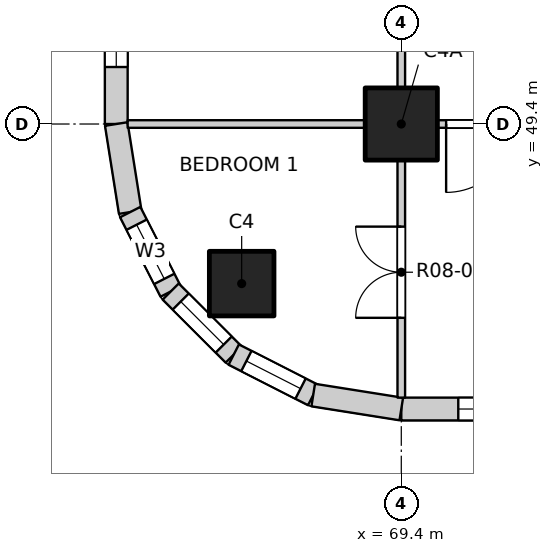
"""IFC4 building model, lengths in metres.
Left out: names, types, materials, properties, quantities, classifications, styles, units other than length and angle.
Written with IfcOpenShell. Run it as: python <this file> out.ifc"""

import sys

from ifc_helpers import new_model, si_unit, direction, frame, frame_2d, origin, origin_2d, place, context, subcontext, project, spatial, rectangle, extrude, element, fill, save


model = new_model("IFC4")
c1 = context("Model", 3, precision=1e-05, world=origin(), true_north=direction((0.0, 1.0)))
c2 = subcontext(c1, "Body", "Model", "MODEL_VIEW")
j1 = project(units=[si_unit("LENGTHUNIT", "METRE"), si_unit("PLANEANGLEUNIT", "RADIAN")], contexts=[c1])
p1 = place(None, origin())
s1 = spatial("IfcSite", under=j1, at=p1, CompositionType="ELEMENT")
p2 = place(p1, origin())
s2 = spatial("IfcBuilding", under=s1, at=p2, CompositionType="ELEMENT")
p3 = place(p2, frame((0.0, 0.0, 103.3)))
s3 = spatial("IfcBuildingStorey", under=s2, at=p3, CompositionType="ELEMENT", Elevation=103.3)
p4 = place(p3, frame((67.3, 47.3, -0.25), z_axis=(0.0, 0.0, 1.0), x_axis=(1.0, 0.0, 0.0)))
e1 = element("IfcColumn", 1, at=p4, inside=s3, PredefinedType="COLUMN", context=c2, shape_type="SweptSolid", body=[
    extrude(rectangle(XDim=0.85, YDim=0.85, at=origin_2d()), origin(), (0.0, 0.0, 1.0), 3.4),
])
p5 = place(p3, frame((69.4, 49.4, -0.25), z_axis=(0.0, 0.0, 1.0), x_axis=(1.0, 0.0, 0.0)))
e2 = element("IfcColumn", 2, at=p5, inside=s3, PredefinedType="COLUMN", context=c2, shape_type="SweptSolid", body=[
    extrude(rectangle(XDim=0.95, YDim=0.95, at=origin_2d()), origin(), (0.0, 0.0, 1.0), 3.4),
])
p6 = place(p3, frame((69.4, 45.65, 0.0), z_axis=(0.0, 0.0, 1.0), x_axis=(1.0, 0.0, 0.0)))
e3 = element("IfcWall", 3, at=p6, inside=s3, PredefinedType="SOLIDWALL", context=c2, shape_type="SweptSolid", body=[
    extrude(rectangle(XDim=3.475, YDim=0.3, at=frame_2d((1.738, 0.0))), origin(), (0.0, 0.0, 1.0), 2.7),
])
p7 = place(p6, frame((0.75, 0.0, 0.9)))
e4 = element("IfcOpeningElement", 4, at=p7, cuts=e3, PredefinedType="OPENING", context=c2, shape_type="SweptSolid", body=[
    extrude(rectangle(XDim=2.4, YDim=1.8, at=frame_2d((1.2, 0.9))), frame((0.0, 0.16, 0.0), z_axis=(0.0, -1.0, 0.0), x_axis=(1.0, 0.0, 0.0)), (0.0, 0.0, 1.0), 0.32),
])
p8 = place(p3, frame((65.65, 49.4, 0.0), z_axis=(0.0, 0.0, 1.0), x_axis=(0.0, 1.0, 0.0)))
e5 = element("IfcWall", 5, at=p8, inside=s3, PredefinedType="SOLIDWALL", context=c2, shape_type="SweptSolid", body=[
    extrude(rectangle(XDim=3.475, YDim=0.3, at=frame_2d((1.738, 0.0))), origin(), (0.0, 0.0, 1.0), 2.7),
])
p9 = place(p8, frame((0.75, 0.0, 0.9)))
e6 = element("IfcOpeningElement", 6, at=p9, cuts=e5, PredefinedType="OPENING", context=c2, shape_type="SweptSolid", body=[
    extrude(rectangle(XDim=2.4, YDim=1.8, at=frame_2d((1.2, 0.9))), frame((0.0, 0.16, 0.0), z_axis=(0.0, -1.0, 0.0), x_axis=(1.0, 0.0, 0.0)), (0.0, 0.0, 1.0), 0.32),
])
p10 = place(p3, frame((65.65, 49.4, 0.0), z_axis=(0.0, 0.0, 1.0), x_axis=(0.156496880861, -0.987678452879, 0.0)))
e7 = element("IfcWall", 7, at=p10, inside=s3, PredefinedType="SOLIDWALL", context=c2, shape_type="SweptSolid", body=[
    extrude(rectangle(XDim=1.173, YDim=0.3, at=frame_2d((0.586, 0.0))), origin(), (0.0, 0.0, 1.0), 2.7),
])
p11 = place(p3, frame((65.833, 48.241, 0.0), z_axis=(0.0, 0.0, 1.0), x_axis=(0.454025524128, -0.890988677504, 0.0)))
e8 = element("IfcWall", 8, at=p11, inside=s3, PredefinedType="SOLIDWALL", context=c2, shape_type="SweptSolid", body=[
    extrude(rectangle(XDim=1.173, YDim=0.3, at=frame_2d((0.587, 0.0))), origin(), (0.0, 0.0, 1.0), 2.7),
])
p12 = place(p11, frame((0.187, 0.0, 0.9)))
e9 = element("IfcOpeningElement", 9, at=p12, cuts=e8, PredefinedType="OPENING", context=c2, shape_type="SweptSolid", body=[
    extrude(rectangle(XDim=0.8, YDim=1.2, at=frame_2d((0.4, 0.6))), frame((0.0, 0.16, 0.0), z_axis=(0.0, -1.0, 0.0), x_axis=(1.0, 0.0, 0.0)), (0.0, 0.0, 1.0), 0.32),
])
p13 = place(p3, frame((66.366, 47.196, 0.0), z_axis=(0.0, 0.0, 1.0), x_axis=(0.707106781187, -0.707106781187, 0.0)))
e10 = element("IfcWall", 10, at=p13, inside=s3, PredefinedType="SOLIDWALL", context=c2, shape_type="SweptSolid", body=[
    extrude(rectangle(XDim=1.173, YDim=0.3, at=frame_2d((0.586, 0.0))), origin(), (0.0, 0.0, 1.0), 2.7),
])
p14 = place(p13, frame((0.187, 0.0, 0.9)))
e11 = element("IfcOpeningElement", 11, at=p14, cuts=e10, PredefinedType="OPENING", context=c2, shape_type="SweptSolid", body=[
    extrude(rectangle(XDim=0.8, YDim=1.2, at=frame_2d((0.4, 0.6))), frame((0.0, 0.16, 0.0), z_axis=(0.0, -1.0, 0.0), x_axis=(1.0, 0.0, 0.0)), (0.0, 0.0, 1.0), 0.32),
])
p15 = place(p3, frame((67.196, 46.366, 0.0), z_axis=(0.0, 0.0, 1.0), x_axis=(0.890988677504, -0.454025524128, 0.0)))
e12 = element("IfcWall", 12, at=p15, inside=s3, PredefinedType="SOLIDWALL", context=c2, shape_type="SweptSolid", body=[
    extrude(rectangle(XDim=1.173, YDim=0.3, at=frame_2d((0.587, 0.0))), origin(), (0.0, 0.0, 1.0), 2.7),
])
p16 = place(p15, frame((0.187, 0.0, 0.9)))
e13 = element("IfcOpeningElement", 13, at=p16, cuts=e12, PredefinedType="OPENING", context=c2, shape_type="SweptSolid", body=[
    extrude(rectangle(XDim=0.8, YDim=1.2, at=frame_2d((0.4, 0.6))), frame((0.0, 0.16, 0.0), z_axis=(0.0, -1.0, 0.0), x_axis=(1.0, 0.0, 0.0)), (0.0, 0.0, 1.0), 0.32),
])
p17 = place(p3, frame((68.241, 45.833, 0.0), z_axis=(0.0, 0.0, 1.0), x_axis=(0.987678452879, -0.156496880861, 0.0)))
e14 = element("IfcWall", 14, at=p17, inside=s3, PredefinedType="SOLIDWALL", context=c2, shape_type="SweptSolid", body=[
    extrude(rectangle(XDim=1.173, YDim=0.3, at=frame_2d((0.586, 0.0))), origin(), (0.0, 0.0, 1.0), 2.7),
])
p18 = place(p3, frame((65.8, 49.4, 0.0), z_axis=(0.0, 0.0, 1.0), x_axis=(1.0, 0.0, 0.0)))
e15 = element("IfcWall", 15, at=p18, inside=s3, PredefinedType="PARTITIONING", context=c2, shape_type="SweptSolid", body=[
    extrude(rectangle(XDim=38.4, YDim=0.1, at=frame_2d((19.2, 0.0))), origin(), (0.0, 0.0, 1.0), 3.15),
])
p19 = place(p18, frame((4.19, 0.0, 0.0)))
e16 = element("IfcOpeningElement", 16, at=p19, cuts=e15, PredefinedType="OPENING", context=c2, shape_type="SweptSolid", body=[
    extrude(rectangle(XDim=0.9, YDim=2.1, at=frame_2d((0.45, 1.05))), frame((0.0, 0.06, 0.0), z_axis=(0.0, -1.0, 0.0), x_axis=(1.0, 0.0, 0.0)), (0.0, 0.0, 1.0), 0.12),
])
p20 = place(p18, frame((9.0, 0.0, 0.0)))
e17 = element("IfcOpeningElement", 17, at=p20, cuts=e15, PredefinedType="OPENING", context=c2, shape_type="SweptSolid", body=[
    extrude(rectangle(XDim=0.9, YDim=2.1, at=frame_2d((0.45, 1.05))), frame((0.0, 0.06, 0.0), z_axis=(0.0, -1.0, 0.0), x_axis=(1.0, 0.0, 0.0)), (0.0, 0.0, 1.0), 0.12),
])
p21 = place(p18, frame((12.9, 0.0, 0.0)))
e18 = element("IfcOpeningElement", 18, at=p21, cuts=e15, PredefinedType="OPENING", context=c2, shape_type="SweptSolid", body=[
    extrude(rectangle(XDim=0.9, YDim=2.1, at=frame_2d((0.45, 1.05))), frame((0.0, 0.06, 0.0), z_axis=(0.0, -1.0, 0.0), x_axis=(1.0, 0.0, 0.0)), (0.0, 0.0, 1.0), 0.12),
])
p22 = place(p18, frame((16.8, 0.0, 0.0)))
e19 = element("IfcOpeningElement", 19, at=p22, cuts=e15, PredefinedType="OPENING", context=c2, shape_type="SweptSolid", body=[
    extrude(rectangle(XDim=0.9, YDim=2.1, at=frame_2d((0.45, 1.05))), frame((0.0, 0.06, 0.0), z_axis=(0.0, -1.0, 0.0), x_axis=(1.0, 0.0, 0.0)), (0.0, 0.0, 1.0), 0.12),
])
p23 = place(p18, frame((20.7, 0.0, 0.0)))
e20 = element("IfcOpeningElement", 20, at=p23, cuts=e15, PredefinedType="OPENING", context=c2, shape_type="SweptSolid", body=[
    extrude(rectangle(XDim=0.9, YDim=2.1, at=frame_2d((0.45, 1.05))), frame((0.0, 0.06, 0.0), z_axis=(0.0, -1.0, 0.0), x_axis=(1.0, 0.0, 0.0)), (0.0, 0.0, 1.0), 0.12),
])
p24 = place(p18, frame((24.6, 0.0, 0.0)))
e21 = element("IfcOpeningElement", 21, at=p24, cuts=e15, PredefinedType="OPENING", context=c2, shape_type="SweptSolid", body=[
    extrude(rectangle(XDim=0.9, YDim=2.1, at=frame_2d((0.45, 1.05))), frame((0.0, 0.06, 0.0), z_axis=(0.0, -1.0, 0.0), x_axis=(1.0, 0.0, 0.0)), (0.0, 0.0, 1.0), 0.12),
])
p25 = place(p18, frame((28.5, 0.0, 0.0)))
e22 = element("IfcOpeningElement", 22, at=p25, cuts=e15, PredefinedType="OPENING", context=c2, shape_type="SweptSolid", body=[
    extrude(rectangle(XDim=0.9, YDim=2.1, at=frame_2d((0.45, 1.05))), frame((0.0, 0.06, 0.0), z_axis=(0.0, -1.0, 0.0), x_axis=(1.0, 0.0, 0.0)), (0.0, 0.0, 1.0), 0.12),
])
p26 = place(p18, frame((33.31, 0.0, 0.0)))
e23 = element("IfcOpeningElement", 23, at=p26, cuts=e15, PredefinedType="OPENING", context=c2, shape_type="SweptSolid", body=[
    extrude(rectangle(XDim=0.9, YDim=2.1, at=frame_2d((0.45, 1.05))), frame((0.0, 0.06, 0.0), z_axis=(0.0, -1.0, 0.0), x_axis=(1.0, 0.0, 0.0)), (0.0, 0.0, 1.0), 0.12),
])
p27 = place(p3, frame((69.4, 45.8, 0.0), z_axis=(0.0, 0.0, 1.0), x_axis=(0.0, 1.0, 0.0)))
e24 = element("IfcWall", 24, at=p27, inside=s3, PredefinedType="PARTITIONING", context=c2, shape_type="SweptSolid", body=[
    extrude(rectangle(XDim=38.4, YDim=0.1, at=frame_2d((19.2, 0.0))), origin(), (0.0, 0.0, 1.0), 3.15),
])
p28 = place(p27, frame((1.05, 0.0, 0.0)))
e25 = element("IfcOpeningElement", 25, at=p28, cuts=e24, PredefinedType="OPENING", context=c2, shape_type="SweptSolid", body=[
    extrude(rectangle(XDim=1.2, YDim=2.1, at=frame_2d((0.6, 1.05))), frame((0.0, 0.06, 0.0), z_axis=(0.0, -1.0, 0.0), x_axis=(1.0, 0.0, 0.0)), (0.0, 0.0, 1.0), 0.12),
])
p29 = place(p27, frame((5.1, 0.0, 0.0)))
e26 = element("IfcOpeningElement", 26, at=p29, cuts=e24, PredefinedType="OPENING", context=c2, shape_type="SweptSolid", body=[
    extrude(rectangle(XDim=0.9, YDim=2.1, at=frame_2d((0.45, 1.05))), frame((0.0, 0.06, 0.0), z_axis=(0.0, -1.0, 0.0), x_axis=(1.0, 0.0, 0.0)), (0.0, 0.0, 1.0), 0.12),
])
p30 = place(p27, frame((9.0, 0.0, 0.0)))
e27 = element("IfcOpeningElement", 27, at=p30, cuts=e24, PredefinedType="OPENING", context=c2, shape_type="SweptSolid", body=[
    extrude(rectangle(XDim=0.9, YDim=2.1, at=frame_2d((0.45, 1.05))), frame((0.0, 0.06, 0.0), z_axis=(0.0, -1.0, 0.0), x_axis=(1.0, 0.0, 0.0)), (0.0, 0.0, 1.0), 0.12),
])
p31 = place(p27, frame((12.9, 0.0, 0.0)))
e28 = element("IfcOpeningElement", 28, at=p31, cuts=e24, PredefinedType="OPENING", context=c2, shape_type="SweptSolid", body=[
    extrude(rectangle(XDim=0.9, YDim=2.1, at=frame_2d((0.45, 1.05))), frame((0.0, 0.06, 0.0), z_axis=(0.0, -1.0, 0.0), x_axis=(1.0, 0.0, 0.0)), (0.0, 0.0, 1.0), 0.12),
])
p32 = place(p27, frame((16.8, 0.0, 0.0)))
e29 = element("IfcOpeningElement", 29, at=p32, cuts=e24, PredefinedType="OPENING", context=c2, shape_type="SweptSolid", body=[
    extrude(rectangle(XDim=0.9, YDim=2.1, at=frame_2d((0.45, 1.05))), frame((0.0, 0.06, 0.0), z_axis=(0.0, -1.0, 0.0), x_axis=(1.0, 0.0, 0.0)), (0.0, 0.0, 1.0), 0.12),
])
p33 = place(p27, frame((20.7, 0.0, 0.0)))
e30 = element("IfcOpeningElement", 30, at=p33, cuts=e24, PredefinedType="OPENING", context=c2, shape_type="SweptSolid", body=[
    extrude(rectangle(XDim=0.9, YDim=2.1, at=frame_2d((0.45, 1.05))), frame((0.0, 0.06, 0.0), z_axis=(0.0, -1.0, 0.0), x_axis=(1.0, 0.0, 0.0)), (0.0, 0.0, 1.0), 0.12),
])
p34 = place(p27, frame((24.6, 0.0, 0.0)))
e31 = element("IfcOpeningElement", 31, at=p34, cuts=e24, PredefinedType="OPENING", context=c2, shape_type="SweptSolid", body=[
    extrude(rectangle(XDim=0.9, YDim=2.1, at=frame_2d((0.45, 1.05))), frame((0.0, 0.06, 0.0), z_axis=(0.0, -1.0, 0.0), x_axis=(1.0, 0.0, 0.0)), (0.0, 0.0, 1.0), 0.12),
])
p35 = place(p27, frame((28.5, 0.0, 0.0)))
e32 = element("IfcOpeningElement", 32, at=p35, cuts=e24, PredefinedType="OPENING", context=c2, shape_type="SweptSolid", body=[
    extrude(rectangle(XDim=0.9, YDim=2.1, at=frame_2d((0.45, 1.05))), frame((0.0, 0.06, 0.0), z_axis=(0.0, -1.0, 0.0), x_axis=(1.0, 0.0, 0.0)), (0.0, 0.0, 1.0), 0.12),
])
p36 = place(p27, frame((32.4, 0.0, 0.0)))
e33 = element("IfcOpeningElement", 33, at=p36, cuts=e24, PredefinedType="OPENING", context=c2, shape_type="SweptSolid", body=[
    extrude(rectangle(XDim=0.9, YDim=2.1, at=frame_2d((0.45, 1.05))), frame((0.0, 0.06, 0.0), z_axis=(0.0, -1.0, 0.0), x_axis=(1.0, 0.0, 0.0)), (0.0, 0.0, 1.0), 0.12),
])
p37 = place(p27, frame((36.15, 0.0, 0.0)))
e34 = element("IfcOpeningElement", 34, at=p37, cuts=e24, PredefinedType="OPENING", context=c2, shape_type="SweptSolid", body=[
    extrude(rectangle(XDim=1.2, YDim=2.1, at=frame_2d((0.6, 1.05))), frame((0.0, 0.06, 0.0), z_axis=(0.0, -1.0, 0.0), x_axis=(1.0, 0.0, 0.0)), (0.0, 0.0, 1.0), 0.12),
])
p38 = place(p7, origin())
e35 = element("IfcWindow", 35, at=p38, inside=s3, PartitioningType="DOUBLE_PANEL_VERTICAL", PredefinedType="WINDOW", context=c2, shape_type="SweptSolid", body=[
    extrude(rectangle(XDim=2.4, YDim=1.8, at=frame_2d((1.2, 0.9))), frame((0.0, 0.03, 0.0), z_axis=(0.0, -1.0, 0.0), x_axis=(1.0, 0.0, 0.0)), (0.0, 0.0, 1.0), 0.06),
])
fill(e4, e35)
p39 = place(p9, origin())
e36 = element("IfcWindow", 36, at=p39, inside=s3, PartitioningType="DOUBLE_PANEL_VERTICAL", PredefinedType="WINDOW", context=c2, shape_type="SweptSolid", body=[
    extrude(rectangle(XDim=2.4, YDim=1.8, at=frame_2d((1.2, 0.9))), frame((0.0, 0.03, 0.0), z_axis=(0.0, -1.0, 0.0), x_axis=(1.0, 0.0, 0.0)), (0.0, 0.0, 1.0), 0.06),
])
fill(e6, e36)
p40 = place(p12, origin())
e37 = element("IfcWindow", 37, at=p40, inside=s3, PartitioningType="SINGLE_PANEL", PredefinedType="WINDOW", context=c2, shape_type="SweptSolid", body=[
    extrude(rectangle(XDim=0.8, YDim=1.2, at=frame_2d((0.4, 0.6))), frame((0.0, 0.03, 0.0), z_axis=(0.0, -1.0, 0.0), x_axis=(1.0, 0.0, 0.0)), (0.0, 0.0, 1.0), 0.06),
])
fill(e9, e37)
p41 = place(p14, origin())
e38 = element("IfcWindow", 38, at=p41, inside=s3, PartitioningType="SINGLE_PANEL", PredefinedType="WINDOW", context=c2, shape_type="SweptSolid", body=[
    extrude(rectangle(XDim=0.8, YDim=1.2, at=frame_2d((0.4, 0.6))), frame((0.0, 0.03, 0.0), z_axis=(0.0, -1.0, 0.0), x_axis=(1.0, 0.0, 0.0)), (0.0, 0.0, 1.0), 0.06),
])
fill(e11, e38)
p42 = place(p16, origin())
e39 = element("IfcWindow", 39, at=p42, inside=s3, PartitioningType="SINGLE_PANEL", PredefinedType="WINDOW", context=c2, shape_type="SweptSolid", body=[
    extrude(rectangle(XDim=0.8, YDim=1.2, at=frame_2d((0.4, 0.6))), frame((0.0, 0.03, 0.0), z_axis=(0.0, -1.0, 0.0), x_axis=(1.0, 0.0, 0.0)), (0.0, 0.0, 1.0), 0.06),
])
fill(e13, e39)
p43 = place(p28, origin())
e40 = element("IfcDoor", 40, at=p43, inside=s3, OperationType="DOUBLE_DOOR_SINGLE_SWING", PredefinedType="DOOR", context=c2, shape_type="SweptSolid", body=[
    extrude(rectangle(XDim=1.2, YDim=2.1, at=frame_2d((0.6, 1.05))), frame((0.0, 0.025, 0.0), z_axis=(0.0, -1.0, 0.0), x_axis=(1.0, 0.0, 0.0)), (0.0, 0.0, 1.0), 0.05),
])
fill(e25, e40)
p44 = place(p19, origin())
e41 = element("IfcDoor", 41, at=p44, inside=s3, OperationType="SINGLE_SWING_RIGHT", PredefinedType="DOOR", context=c2, shape_type="SweptSolid", body=[
    extrude(rectangle(XDim=0.9, YDim=2.1, at=frame_2d((0.45, 1.05))), frame((0.0, 0.025, 0.0), z_axis=(0.0, -1.0, 0.0), x_axis=(1.0, 0.0, 0.0)), (0.0, 0.0, 1.0), 0.05),
])
fill(e16, e41)
save(model, sys.argv[1])
